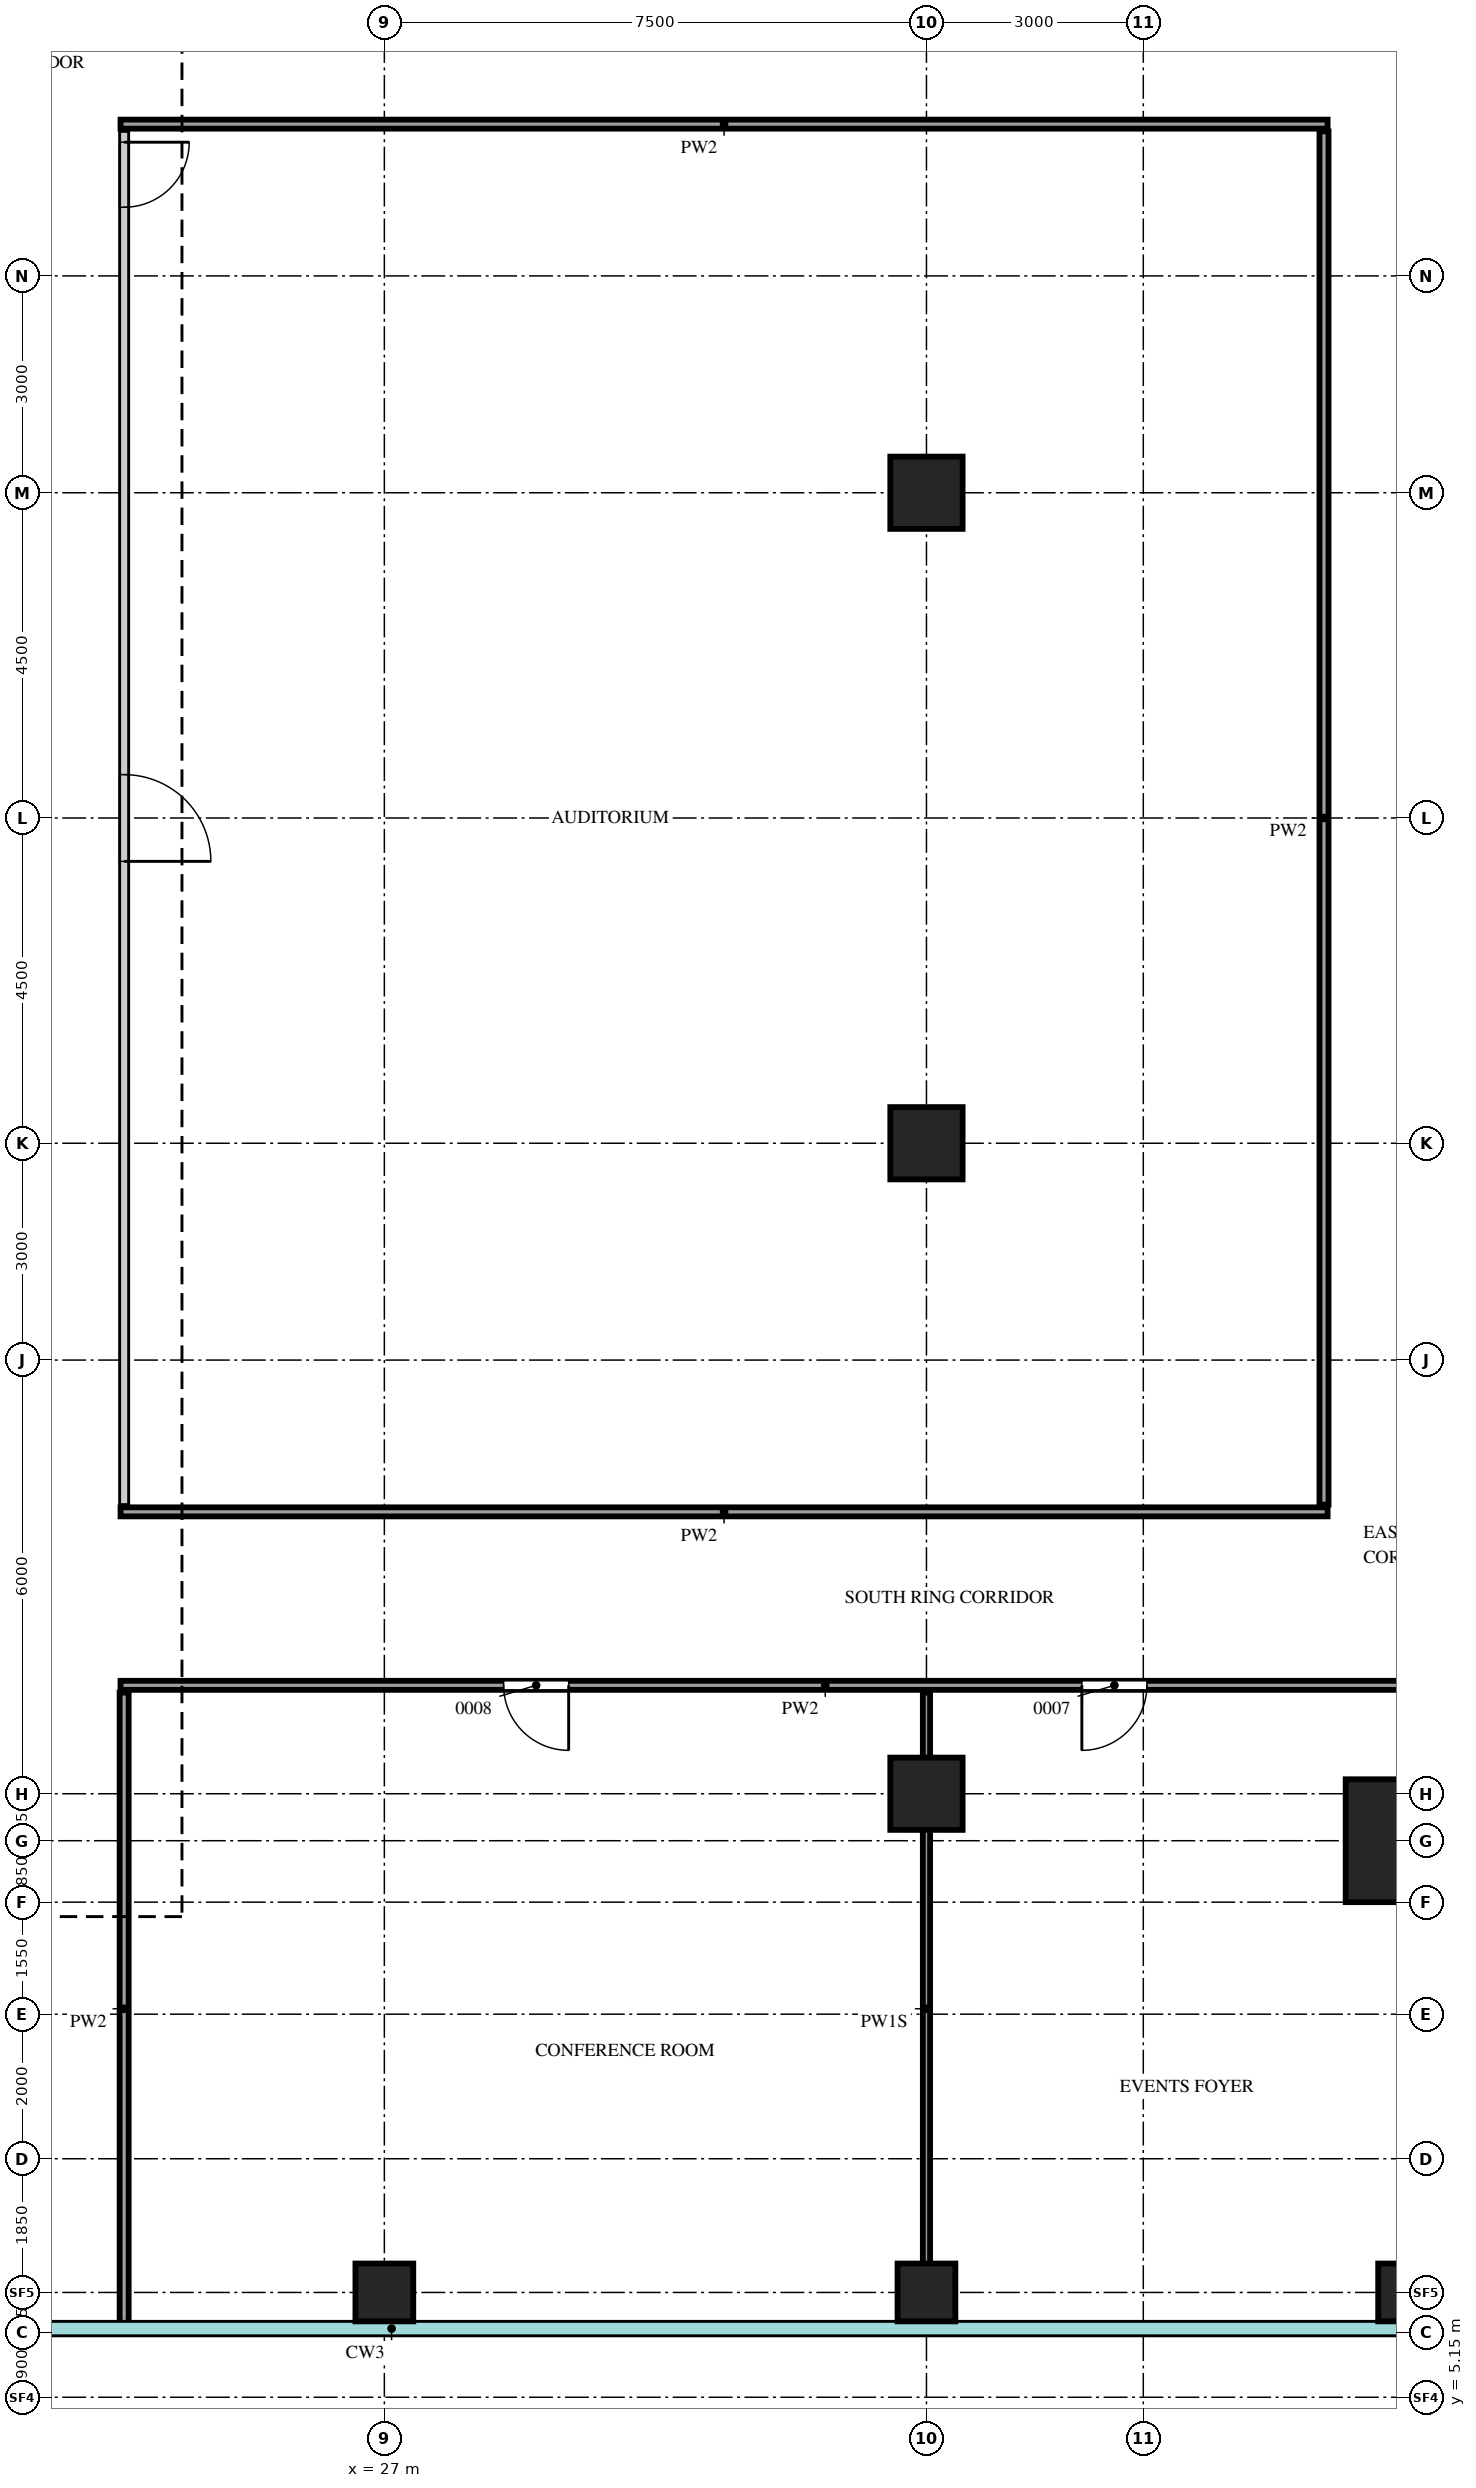
"""IFC4 building model, lengths in metres.
Left out: names, types, materials, properties, quantities, classifications, styles, units other than length and angle.
Written with IfcOpenShell. Run it as: python <this file> out.ifc"""

import sys

from ifc_helpers import new_model, si_unit, direction, frame, frame_2d, origin, origin_2d, place, context, subcontext, project, spatial, rectangle, extrude, source, transform, mapped, element, fill, save


model = new_model("IFC4")
c1 = context("Model", 3, precision=1e-05, world=origin(), true_north=direction((0.0, 1.0)))
c2 = subcontext(c1, "Body", "Model", "MODEL_VIEW")
j1 = project(units=[si_unit("LENGTHUNIT", "METRE"), si_unit("PLANEANGLEUNIT", "RADIAN")], contexts=[c1])
p1 = place(None, origin())
s1 = spatial("IfcSite", under=j1, at=p1, CompositionType="ELEMENT")
p2 = place(p1, origin())
s2 = spatial("IfcBuilding", under=s1, at=p2, CompositionType="ELEMENT")
p3 = place(p2, frame((0.0, 0.0, 326.2)))
s3 = spatial("IfcBuildingStorey", under=s2, at=p3, CompositionType="ELEMENT", Elevation=326.2)
m1 = source(origin(), c2, "Body", "SweptSolid", [
    extrude(rectangle(XDim=1.7, YDim=1.7, at=origin_2d()), origin(), (0.0, 0.0, 1.0), 3.75),
])
p4 = place(p3, frame((41.15, 12.85, 0.0), z_axis=(0.0, 0.0, 1.0), x_axis=(1.0, 0.0, 0.0)))
e1 = element("IfcColumn", 1, at=p4, inside=s3, PredefinedType="COLUMN", context=c2, shape_type="MappedRepresentation", body=[
    mapped(m1, transform((0.0, 0.0, 0.0))),
])
m2 = source(origin(), c2, "Body", "SweptSolid", [
    extrude(rectangle(XDim=0.8, YDim=0.8, at=origin_2d()), origin(), (0.0, 0.0, 1.0), 3.75),
])
for number, where, z_axis, x_axis in (
    (2, (27.0, 6.6, 0.0), (0.0, 0.0, 1.0), (1.0, 0.0, 0.0)),
    (3, (34.5, 6.6, 0.0), (0.0, 0.0, 1.0), (1.0, 0.0, 0.0)),
    (4, (41.15, 6.6, 0.0), (0.0, 0.0, 1.0), (1.0, 0.0, 0.0)),
):
    element("IfcColumn", number, at=place(p3, frame(where, z_axis=z_axis, x_axis=x_axis)), inside=s3, PredefinedType="COLUMN", context=c2, shape_type="MappedRepresentation", body=[
        mapped(m2, transform((0.0, 0.0, 0.0))),
    ])
m3 = source(origin(), c2, "Body", "SweptSolid", [
    extrude(rectangle(XDim=1.0, YDim=1.0, at=origin_2d()), origin(), (0.0, 0.0, 1.0), 3.75),
])
for number, where, z_axis, x_axis in (
    (5, (34.5, 13.5, 0.0), (0.0, 0.0, 1.0), (1.0, 0.0, 0.0)),
    (6, (34.5, 22.5, 0.0), (0.0, 0.0, 1.0), (1.0, 0.0, 0.0)),
    (7, (34.5, 31.5, 0.0), (0.0, 0.0, 1.0), (1.0, 0.0, 0.0)),
):
    element("IfcColumn", number, at=place(p3, frame(where, z_axis=z_axis, x_axis=x_axis)), inside=s3, PredefinedType="COLUMN", context=c2, shape_type="MappedRepresentation", body=[
        mapped(m3, transform((0.0, 0.0, 0.0))),
    ])
m4 = source(origin(), c2, "Body", "SweptSolid", [
    extrude(rectangle(XDim=8.75, YDim=0.125, at=frame_2d((4.375, 0.0))), origin(), (0.0, 0.0, 1.0), 3.8),
])
p5 = place(p3, frame((23.4, 6.15, 0.0), z_axis=(0.0, 0.0, 1.0), x_axis=(0.0, 1.0, 0.0)))
e8 = element("IfcWall", 8, at=p5, inside=s3, PredefinedType="PARTITIONING", context=c2, shape_type="MappedRepresentation", body=[
    mapped(m4, transform((0.0, 0.0, 0.0))),
])
m5 = source(origin(), c2, "Body", "SweptSolid", [
    extrude(rectangle(XDim=8.75, YDim=0.1, at=frame_2d((4.375, 0.0))), origin(), (0.0, 0.0, 1.0), 3.35),
])
p6 = place(p3, frame((34.5, 6.15, 0.0), z_axis=(0.0, 0.0, 1.0), x_axis=(0.0, 1.0, 0.0)))
e9 = element("IfcWall", 9, at=p6, inside=s3, PredefinedType="PARTITIONING", context=c2, shape_type="MappedRepresentation", body=[
    mapped(m5, transform((0.0, 0.0, 0.0))),
])
m6 = source(origin(), c2, "Body", "SweptSolid", [
    extrude(rectangle(XDim=19.1, YDim=0.125, at=frame_2d((9.55, 0.0))), origin(), (0.0, 0.0, 1.0), 3.8),
])
p7 = place(p3, frame((23.35, 15.0, 0.0), z_axis=(0.0, 0.0, 1.0), x_axis=(1.0, 0.0, 0.0)))
e10 = element("IfcWall", 10, at=p7, inside=s3, PredefinedType="PARTITIONING", context=c2, shape_type="MappedRepresentation", body=[
    mapped(m6, transform((0.0, 0.0, 0.0))),
])
m7 = source(origin(), c2, "Body", "SweptSolid", [
    extrude(rectangle(XDim=0.9, YDim=2.1, at=frame_2d((0.45, 1.05))), frame((0.0, 0.073, 0.0), z_axis=(0.0, -1.0, 0.0), x_axis=(1.0, 0.0, 0.0)), (0.0, 0.0, 1.0), 0.145),
])
p8 = place(p7, frame((5.3, 0.0, 0.0)))
e11 = element("IfcOpeningElement", 11, at=p8, cuts=e10, PredefinedType="OPENING", context=c2, shape_type="MappedRepresentation", body=[
    mapped(m7, transform((0.0, 0.0, 0.0))),
])
p9 = place(p7, frame((13.3, 0.0, 0.0)))
e12 = element("IfcOpeningElement", 12, at=p9, cuts=e10, PredefinedType="OPENING", context=c2, shape_type="MappedRepresentation", body=[
    mapped(m7, transform((0.0, 0.0, 0.0))),
])
m8 = source(origin(), c2, "Body", "SweptSolid", [
    extrude(rectangle(XDim=16.7, YDim=0.125, at=frame_2d((8.35, 0.0))), origin(), (0.0, 0.0, 1.0), 3.8),
])
p10 = place(p3, frame((23.35, 17.4, 0.0), z_axis=(0.0, 0.0, 1.0), x_axis=(1.0, 0.0, 0.0)))
e13 = element("IfcWall", 13, at=p10, inside=s3, PredefinedType="PARTITIONING", context=c2, shape_type="MappedRepresentation", body=[
    mapped(m8, transform((0.0, 0.0, 0.0))),
])
m9 = source(origin(), c2, "Body", "SweptSolid", [
    extrude(rectangle(XDim=19.0, YDim=0.125, at=frame_2d((9.5, 0.0))), origin(), (0.0, 0.0, 1.0), 3.8),
])
p11 = place(p3, frame((23.4, 17.5, 0.0), z_axis=(0.0, 0.0, 1.0), x_axis=(0.0, 1.0, 0.0)))
e14 = element("IfcWall", 14, at=p11, inside=s3, PredefinedType="PARTITIONING", context=c2, shape_type="MappedRepresentation", body=[
    mapped(m9, transform((0.0, 0.0, 0.0))),
])
m10 = source(origin(), c2, "Body", "SweptSolid", [
    extrude(rectangle(XDim=1.2, YDim=2.1, at=frame_2d((0.6, 1.05))), frame((0.0, 0.073, 0.0), z_axis=(0.0, -1.0, 0.0), x_axis=(1.0, 0.0, 0.0)), (0.0, 0.0, 1.0), 0.145),
])
p12 = place(p11, frame((8.9, 0.0, 0.0)))
e15 = element("IfcOpeningElement", 15, at=p12, cuts=e14, PredefinedType="OPENING", context=c2, shape_type="MappedRepresentation", body=[
    mapped(m10, transform((0.0, 0.0, 0.0))),
])
p13 = place(p11, frame((17.95, 0.0, 0.0)))
e16 = element("IfcOpeningElement", 16, at=p13, cuts=e14, PredefinedType="OPENING", context=c2, shape_type="MappedRepresentation", body=[
    mapped(m7, transform((0.0, 0.0, 0.0))),
])
p14 = place(p3, frame((40.0, 17.5, 0.0), z_axis=(0.0, 0.0, 1.0), x_axis=(0.0, 1.0, 0.0)))
e17 = element("IfcWall", 17, at=p14, inside=s3, PredefinedType="PARTITIONING", context=c2, shape_type="MappedRepresentation", body=[
    mapped(m9, transform((0.0, 0.0, 0.0))),
])
p15 = place(p3, frame((23.35, 36.6, 0.0), z_axis=(0.0, 0.0, 1.0), x_axis=(1.0, 0.0, 0.0)))
e18 = element("IfcWall", 18, at=p15, inside=s3, PredefinedType="PARTITIONING", context=c2, shape_type="MappedRepresentation", body=[
    mapped(m8, transform((0.0, 0.0, 0.0))),
])
m11 = source(origin(), c2, "Body", "SweptSolid", [
    extrude(rectangle(XDim=0.9, YDim=2.1, at=frame_2d((0.45, 1.05))), frame((0.0, 0.025, 0.0), z_axis=(0.0, -1.0, 0.0), x_axis=(1.0, 0.0, 0.0)), (0.0, 0.0, 1.0), 0.05),
])
p16 = place(p8, origin())
e19 = element("IfcDoor", 19, at=p16, inside=s3, OperationType="SINGLE_SWING_RIGHT", PredefinedType="DOOR", context=c2, shape_type="MappedRepresentation", body=[
    mapped(m11, transform((0.0, 0.0, 0.0))),
])
fill(e11, e19)
p17 = place(p9, origin())
e20 = element("IfcDoor", 20, at=p17, inside=s3, OperationType="SINGLE_SWING_LEFT", PredefinedType="DOOR", context=c2, shape_type="MappedRepresentation", body=[
    mapped(m11, transform((0.0, 0.0, 0.0))),
])
fill(e12, e20)
m12 = source(origin(), c2, "Body", "SweptSolid", [
    extrude(rectangle(XDim=1.2, YDim=2.1, at=frame_2d((0.6, 1.05))), frame((0.0, 0.025, 0.0), z_axis=(0.0, -1.0, 0.0), x_axis=(1.0, 0.0, 0.0)), (0.0, 0.0, 1.0), 0.05),
])
p18 = place(p12, origin())
e21 = element("IfcDoor", 21, at=p18, inside=s3, OperationType="SINGLE_SWING_LEFT", PredefinedType="DOOR", context=c2, shape_type="MappedRepresentation", body=[
    mapped(m12, transform((0.0, 0.0, 0.0))),
])
fill(e15, e21)
p19 = place(p13, origin())
e22 = element("IfcDoor", 22, at=p19, inside=s3, OperationType="SINGLE_SWING_RIGHT", PredefinedType="DOOR", context=c2, shape_type="MappedRepresentation", body=[
    mapped(m11, transform((0.0, 0.0, 0.0))),
])
fill(e16, e22)
save(model, sys.argv[1])
